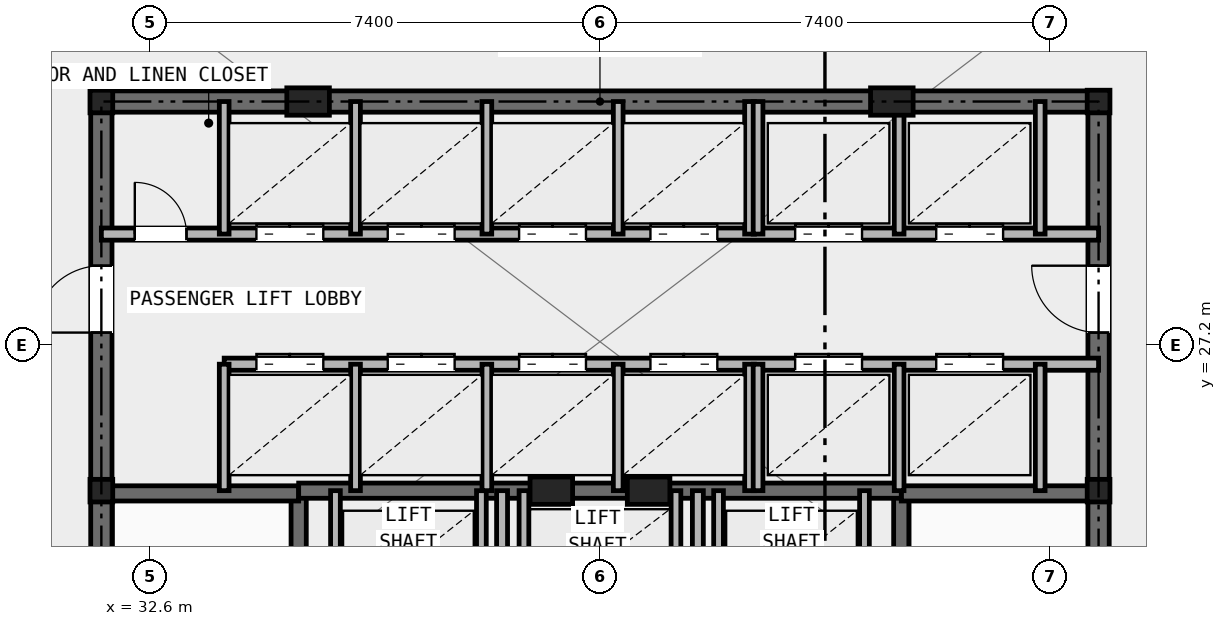
"""IFC4 building model, lengths in metres.
Left out: names, types, materials, properties, quantities, classifications, styles, units other than length and angle.
Written with IfcOpenShell. Run it as: python <this file> out.ifc"""

import sys

from ifc_helpers import new_model, si_unit, direction, frame, frame_2d, origin, origin_2d, place, context, subcontext, project, spatial, rectangle, i_section, extrude, element, fill, save


model = new_model("IFC4")
c1 = context("Model", 3, precision=1e-05, world=origin(), true_north=direction((0.0, 1.0)))
c2 = subcontext(c1, "Body", "Model", "MODEL_VIEW")
j1 = project(units=[si_unit("LENGTHUNIT", "METRE"), si_unit("PLANEANGLEUNIT", "RADIAN")], contexts=[c1])
p1 = place(None, origin())
s1 = spatial("IfcSite", under=j1, at=p1, CompositionType="ELEMENT")
p2 = place(p1, origin())
s2 = spatial("IfcBuilding", under=s1, at=p2, CompositionType="ELEMENT")
p3 = place(p2, origin())
s3 = spatial("IfcBuildingStorey", under=s2, at=p3, CompositionType="ELEMENT", Elevation=0.0)
for number, where, z_axis, x_axis in (
    (1, (31.8, 24.8, 0.0), (0.0, 0.0, 1.0), (1.0, 0.0, 0.0)),
    (2, (48.2, 24.8, 0.0), (0.0, 0.0, 1.0), (1.0, 0.0, 0.0)),
    (3, (31.8, 31.2, 0.0), (0.0, 0.0, 1.0), (1.0, 0.0, 0.0)),
    (4, (48.2, 31.2, 0.0), (0.0, 0.0, 1.0), (1.0, 0.0, 0.0)),
):
    element("IfcColumn", number, at=place(p3, frame(where, z_axis=z_axis, x_axis=x_axis)), inside=s3, PredefinedType="COLUMN", context=c2, shape_type="SweptSolid", body=[
        extrude(i_section(OverallWidth=0.374, OverallDepth=0.372, WebThickness=0.016, FlangeThickness=0.026, at=origin_2d()), origin(), (0.0, 0.0, 1.0), 5.5),
    ])
for number, where, z_axis, x_axis in (
    (5, (35.2, 31.2, 0.0), (0.0, 0.0, 1.0), (1.0, 0.0, 0.0)),
    (6, (44.8, 31.2, 0.0), (0.0, 0.0, 1.0), (1.0, 0.0, 0.0)),
    (7, (39.2, 24.8, 0.0), (0.0, 0.0, 1.0), (1.0, 0.0, 0.0)),
    (8, (40.8, 24.8, 0.0), (0.0, 0.0, 1.0), (1.0, 0.0, 0.0)),
):
    element("IfcColumn", number, at=place(p3, frame(where, z_axis=z_axis, x_axis=x_axis)), inside=s3, PredefinedType="PILASTER", context=c2, shape_type="SweptSolid", body=[
        extrude(rectangle(XDim=0.7, YDim=0.45, at=origin_2d()), origin(), (0.0, 0.0, 1.0), 5.5),
    ])
p4 = place(p3, frame((31.8, 31.2, 0.0), z_axis=(0.0, 0.0, 1.0), x_axis=(1.0, 0.0, 0.0)))
e9 = element("IfcWall", 9, at=p4, inside=s3, PredefinedType="SHEAR", context=c2, shape_type="SweptSolid", body=[
    extrude(rectangle(XDim=16.4, YDim=0.35, at=frame_2d((8.2, 0.0))), origin(), (0.0, 0.0, 1.0), 5.22),
])
p5 = place(p3, frame((31.8, 16.4, 0.0), z_axis=(0.0, 0.0, 1.0), x_axis=(0.0, 1.0, 0.0)))
e10 = element("IfcWall", 10, at=p5, inside=s3, PredefinedType="SHEAR", context=c2, shape_type="SweptSolid", body=[
    extrude(rectangle(XDim=14.8, YDim=0.35, at=frame_2d((7.4, 0.0))), origin(), (0.0, 0.0, 1.0), 5.22),
])
p6 = place(p5, frame((11.0, 0.0, 0.0)))
e11 = element("IfcOpeningElement", 11, at=p6, cuts=e10, PredefinedType="OPENING", context=c2, shape_type="SweptSolid", body=[
    extrude(rectangle(XDim=1.1, YDim=2.15, at=frame_2d((0.55, 1.075))), frame((0.0, 0.185, 0.0), z_axis=(0.0, -1.0, 0.0), x_axis=(1.0, 0.0, 0.0)), (0.0, 0.0, 1.0), 0.37),
])
p7 = place(p3, frame((48.2, 16.4, 0.0), z_axis=(0.0, 0.0, 1.0), x_axis=(0.0, 1.0, 0.0)))
e12 = element("IfcWall", 12, at=p7, inside=s3, PredefinedType="SHEAR", context=c2, shape_type="SweptSolid", body=[
    extrude(rectangle(XDim=14.8, YDim=0.35, at=frame_2d((7.4, 0.0))), origin(), (0.0, 0.0, 1.0), 5.22),
])
p8 = place(p7, frame((11.0, 0.0, 0.0)))
e13 = element("IfcOpeningElement", 13, at=p8, cuts=e12, PredefinedType="OPENING", context=c2, shape_type="SweptSolid", body=[
    extrude(rectangle(XDim=1.1, YDim=2.15, at=frame_2d((0.55, 1.075))), frame((0.0, 0.185, 0.0), z_axis=(0.0, -1.0, 0.0), x_axis=(1.0, 0.0, 0.0)), (0.0, 0.0, 1.0), 0.37),
])
p9 = place(p3, frame((35.045, 16.4, 0.0), z_axis=(0.0, 0.0, 1.0), x_axis=(0.0, 1.0, 0.0)))
e14 = element("IfcWall", 14, at=p9, inside=s3, PredefinedType="SHEAR", context=c2, shape_type="SweptSolid", body=[
    extrude(rectangle(XDim=8.4, YDim=0.25, at=frame_2d((4.2, 0.0))), origin(), (0.0, 0.0, 1.0), 5.22),
])
p10 = place(p9, frame((0.45, 0.0, 0.0)))
e15 = element("IfcOpeningElement", 15, at=p10, cuts=e14, PredefinedType="OPENING", context=c2, shape_type="SweptSolid", body=[
    extrude(rectangle(XDim=0.95, YDim=2.1, at=frame_2d((0.475, 1.05))), frame((0.0, 0.135, 0.0), z_axis=(0.0, -1.0, 0.0), x_axis=(1.0, 0.0, 0.0)), (0.0, 0.0, 1.0), 0.27),
])
p11 = place(p3, frame((31.8, 24.755, 0.0), z_axis=(0.0, 0.0, 1.0), x_axis=(1.0, 0.0, 0.0)))
e16 = element("IfcWall", 16, at=p11, inside=s3, PredefinedType="SHEAR", context=c2, shape_type="SweptSolid", body=[
    extrude(rectangle(XDim=3.245, YDim=0.25, at=frame_2d((1.623, 0.0))), origin(), (0.0, 0.0, 1.0), 5.22),
])
p12 = place(p3, frame((44.955, 16.4, 0.0), z_axis=(0.0, 0.0, 1.0), x_axis=(0.0, 1.0, 0.0)))
e17 = element("IfcWall", 17, at=p12, inside=s3, PredefinedType="SHEAR", context=c2, shape_type="SweptSolid", body=[
    extrude(rectangle(XDim=8.4, YDim=0.25, at=frame_2d((4.2, 0.0))), origin(), (0.0, 0.0, 1.0), 5.22),
])
p13 = place(p12, frame((0.45, 0.0, 0.0)))
e18 = element("IfcOpeningElement", 18, at=p13, cuts=e17, PredefinedType="OPENING", context=c2, shape_type="SweptSolid", body=[
    extrude(rectangle(XDim=0.95, YDim=2.1, at=frame_2d((0.475, 1.05))), frame((0.0, 0.135, 0.0), z_axis=(0.0, -1.0, 0.0), x_axis=(1.0, 0.0, 0.0)), (0.0, 0.0, 1.0), 0.27),
])
p14 = place(p3, frame((44.955, 24.755, 0.0), z_axis=(0.0, 0.0, 1.0), x_axis=(1.0, 0.0, 0.0)))
e19 = element("IfcWall", 19, at=p14, inside=s3, PredefinedType="SHEAR", context=c2, shape_type="SweptSolid", body=[
    extrude(rectangle(XDim=3.245, YDim=0.25, at=frame_2d((1.623, 0.0))), origin(), (0.0, 0.0, 1.0), 5.22),
])
p15 = place(p3, frame((35.045, 24.8, 0.0), z_axis=(0.0, 0.0, 1.0), x_axis=(1.0, 0.0, 0.0)))
e20 = element("IfcWall", 20, at=p15, inside=s3, PredefinedType="SHEAR", context=c2, shape_type="SweptSolid", body=[
    extrude(rectangle(XDim=9.91, YDim=0.25, at=frame_2d((4.955, 0.0))), origin(), (0.0, 0.0, 1.0), 5.22),
])
p16 = place(p3, frame((38.39, 16.4, 0.0), z_axis=(0.0, 0.0, 1.0), x_axis=(0.0, 1.0, 0.0)))
e21 = element("IfcWall", 21, at=p16, inside=s3, PredefinedType="PARTITIONING", context=c2, shape_type="SweptSolid", body=[
    extrude(rectangle(XDim=8.4, YDim=0.18, at=frame_2d((4.2, 0.0))), origin(), (0.0, 0.0, 1.0), 4.671),
])
p17 = place(p16, frame((3.8, 0.0, 0.0)))
e22 = element("IfcOpeningElement", 22, at=p17, cuts=e21, PredefinedType="OPENING", context=c2, shape_type="SweptSolid", body=[
    extrude(rectangle(XDim=0.95, YDim=2.1, at=frame_2d((0.475, 1.05))), frame((0.0, 0.1, 0.0), z_axis=(0.0, -1.0, 0.0), x_axis=(1.0, 0.0, 0.0)), (0.0, 0.0, 1.0), 0.2),
])
p18 = place(p3, frame((41.61, 16.4, 0.0), z_axis=(0.0, 0.0, 1.0), x_axis=(0.0, 1.0, 0.0)))
e23 = element("IfcWall", 23, at=p18, inside=s3, PredefinedType="PARTITIONING", context=c2, shape_type="SweptSolid", body=[
    extrude(rectangle(XDim=8.4, YDim=0.18, at=frame_2d((4.2, 0.0))), origin(), (0.0, 0.0, 1.0), 4.671),
])
for number, where, z_axis, x_axis in (
    (24, (35.65, 22.48, 0.0), (0.0, 0.0, 1.0), (0.0, 1.0, 0.0)),
    (25, (38.05, 22.48, 0.0), (0.0, 0.0, 1.0), (0.0, 1.0, 0.0)),
    (26, (41.95, 22.48, 0.0), (0.0, 0.0, 1.0), (0.0, 1.0, 0.0)),
    (27, (44.35, 22.48, 0.0), (0.0, 0.0, 1.0), (0.0, 1.0, 0.0)),
    (28, (38.75, 22.48, 0.0), (0.0, 0.0, 1.0), (0.0, 1.0, 0.0)),
    (29, (41.25, 22.48, 0.0), (0.0, 0.0, 1.0), (0.0, 1.0, 0.0)),
):
    element("IfcWall", number, at=place(p3, frame(where, z_axis=z_axis, x_axis=x_axis)), inside=s3, PredefinedType="SOLIDWALL", context=c2, shape_type="SweptSolid", body=[
        extrude(rectangle(XDim=2.32, YDim=0.16, at=frame_2d((1.16, 0.0))), origin(), (0.0, 0.0, 1.0), 5.22),
    ])
p19 = place(p3, frame((31.8, 29.02, 0.0), z_axis=(0.0, 0.0, 1.0), x_axis=(1.0, 0.0, 0.0)))
e30 = element("IfcWall", 30, at=p19, inside=s3, PredefinedType="SOLIDWALL", context=c2, shape_type="SweptSolid", body=[
    extrude(rectangle(XDim=16.4, YDim=0.2, at=frame_2d((8.2, 0.0))), origin(), (0.0, 0.0, 1.0), 4.671),
])
p20 = place(p19, frame((0.55, 0.0, 0.0)))
e31 = element("IfcOpeningElement", 31, at=p20, cuts=e30, PredefinedType="OPENING", context=c2, shape_type="SweptSolid", body=[
    extrude(rectangle(XDim=0.85, YDim=2.05, at=frame_2d((0.425, 1.025))), frame((0.0, 0.11, 0.0), z_axis=(0.0, -1.0, 0.0), x_axis=(1.0, 0.0, 0.0)), (0.0, 0.0, 1.0), 0.22),
])
p21 = place(p19, frame((2.55, 0.0, 0.0)))
e32 = element("IfcOpeningElement", 32, at=p21, cuts=e30, PredefinedType="OPENING", context=c2, shape_type="SweptSolid", body=[
    extrude(rectangle(XDim=1.1, YDim=2.15, at=frame_2d((0.55, 1.075))), frame((0.0, 0.11, 0.0), z_axis=(0.0, -1.0, 0.0), x_axis=(1.0, 0.0, 0.0)), (0.0, 0.0, 1.0), 0.22),
])
p22 = place(p19, frame((4.71, 0.0, 0.0)))
e33 = element("IfcOpeningElement", 33, at=p22, cuts=e30, PredefinedType="OPENING", context=c2, shape_type="SweptSolid", body=[
    extrude(rectangle(XDim=1.1, YDim=2.15, at=frame_2d((0.55, 1.075))), frame((0.0, 0.11, 0.0), z_axis=(0.0, -1.0, 0.0), x_axis=(1.0, 0.0, 0.0)), (0.0, 0.0, 1.0), 0.22),
])
p23 = place(p19, frame((6.87, 0.0, 0.0)))
e34 = element("IfcOpeningElement", 34, at=p23, cuts=e30, PredefinedType="OPENING", context=c2, shape_type="SweptSolid", body=[
    extrude(rectangle(XDim=1.1, YDim=2.15, at=frame_2d((0.55, 1.075))), frame((0.0, 0.11, 0.0), z_axis=(0.0, -1.0, 0.0), x_axis=(1.0, 0.0, 0.0)), (0.0, 0.0, 1.0), 0.22),
])
p24 = place(p19, frame((9.03, 0.0, 0.0)))
e35 = element("IfcOpeningElement", 35, at=p24, cuts=e30, PredefinedType="OPENING", context=c2, shape_type="SweptSolid", body=[
    extrude(rectangle(XDim=1.1, YDim=2.15, at=frame_2d((0.55, 1.075))), frame((0.0, 0.11, 0.0), z_axis=(0.0, -1.0, 0.0), x_axis=(1.0, 0.0, 0.0)), (0.0, 0.0, 1.0), 0.22),
])
p25 = place(p19, frame((11.41, 0.0, 0.0)))
e36 = element("IfcOpeningElement", 36, at=p25, cuts=e30, PredefinedType="OPENING", context=c2, shape_type="SweptSolid", body=[
    extrude(rectangle(XDim=1.1, YDim=2.15, at=frame_2d((0.55, 1.075))), frame((0.0, 0.11, 0.0), z_axis=(0.0, -1.0, 0.0), x_axis=(1.0, 0.0, 0.0)), (0.0, 0.0, 1.0), 0.22),
])
p26 = place(p19, frame((13.73, 0.0, 0.0)))
e37 = element("IfcOpeningElement", 37, at=p26, cuts=e30, PredefinedType="OPENING", context=c2, shape_type="SweptSolid", body=[
    extrude(rectangle(XDim=1.1, YDim=2.15, at=frame_2d((0.55, 1.075))), frame((0.0, 0.11, 0.0), z_axis=(0.0, -1.0, 0.0), x_axis=(1.0, 0.0, 0.0)), (0.0, 0.0, 1.0), 0.22),
])
p27 = place(p3, frame((33.82, 26.88, 0.0), z_axis=(0.0, 0.0, 1.0), x_axis=(1.0, 0.0, 0.0)))
e38 = element("IfcWall", 38, at=p27, inside=s3, PredefinedType="SOLIDWALL", context=c2, shape_type="SweptSolid", body=[
    extrude(rectangle(XDim=14.38, YDim=0.2, at=frame_2d((7.19, 0.0))), origin(), (0.0, 0.0, 1.0), 4.671),
])
p28 = place(p27, frame((0.53, 0.0, 0.0)))
e39 = element("IfcOpeningElement", 39, at=p28, cuts=e38, PredefinedType="OPENING", context=c2, shape_type="SweptSolid", body=[
    extrude(rectangle(XDim=1.1, YDim=2.15, at=frame_2d((0.55, 1.075))), frame((0.0, 0.11, 0.0), z_axis=(0.0, -1.0, 0.0), x_axis=(1.0, 0.0, 0.0)), (0.0, 0.0, 1.0), 0.22),
])
p29 = place(p27, frame((2.69, 0.0, 0.0)))
e40 = element("IfcOpeningElement", 40, at=p29, cuts=e38, PredefinedType="OPENING", context=c2, shape_type="SweptSolid", body=[
    extrude(rectangle(XDim=1.1, YDim=2.15, at=frame_2d((0.55, 1.075))), frame((0.0, 0.11, 0.0), z_axis=(0.0, -1.0, 0.0), x_axis=(1.0, 0.0, 0.0)), (0.0, 0.0, 1.0), 0.22),
])
p30 = place(p27, frame((4.85, 0.0, 0.0)))
e41 = element("IfcOpeningElement", 41, at=p30, cuts=e38, PredefinedType="OPENING", context=c2, shape_type="SweptSolid", body=[
    extrude(rectangle(XDim=1.1, YDim=2.15, at=frame_2d((0.55, 1.075))), frame((0.0, 0.11, 0.0), z_axis=(0.0, -1.0, 0.0), x_axis=(1.0, 0.0, 0.0)), (0.0, 0.0, 1.0), 0.22),
])
p31 = place(p27, frame((7.01, 0.0, 0.0)))
e42 = element("IfcOpeningElement", 42, at=p31, cuts=e38, PredefinedType="OPENING", context=c2, shape_type="SweptSolid", body=[
    extrude(rectangle(XDim=1.1, YDim=2.15, at=frame_2d((0.55, 1.075))), frame((0.0, 0.11, 0.0), z_axis=(0.0, -1.0, 0.0), x_axis=(1.0, 0.0, 0.0)), (0.0, 0.0, 1.0), 0.22),
])
p32 = place(p27, frame((9.39, 0.0, 0.0)))
e43 = element("IfcOpeningElement", 43, at=p32, cuts=e38, PredefinedType="OPENING", context=c2, shape_type="SweptSolid", body=[
    extrude(rectangle(XDim=1.1, YDim=2.15, at=frame_2d((0.55, 1.075))), frame((0.0, 0.11, 0.0), z_axis=(0.0, -1.0, 0.0), x_axis=(1.0, 0.0, 0.0)), (0.0, 0.0, 1.0), 0.22),
])
p33 = place(p27, frame((11.71, 0.0, 0.0)))
e44 = element("IfcOpeningElement", 44, at=p33, cuts=e38, PredefinedType="OPENING", context=c2, shape_type="SweptSolid", body=[
    extrude(rectangle(XDim=1.1, YDim=2.15, at=frame_2d((0.55, 1.075))), frame((0.0, 0.11, 0.0), z_axis=(0.0, -1.0, 0.0), x_axis=(1.0, 0.0, 0.0)), (0.0, 0.0, 1.0), 0.22),
])
p34 = place(p3, frame((33.82, 29.02, 0.0), z_axis=(0.0, 0.0, 1.0), x_axis=(0.0, 1.0, 0.0)))
e45 = element("IfcWall", 45, at=p34, inside=s3, PredefinedType="SOLIDWALL", context=c2, shape_type="SweptSolid", body=[
    extrude(rectangle(XDim=2.18, YDim=0.16, at=frame_2d((1.09, 0.0))), origin(), (0.0, 0.0, 1.0), 4.671),
])
p35 = place(p3, frame((33.82, 24.8, 0.0), z_axis=(0.0, 0.0, 1.0), x_axis=(0.0, 1.0, 0.0)))
e46 = element("IfcWall", 46, at=p35, inside=s3, PredefinedType="SOLIDWALL", context=c2, shape_type="SweptSolid", body=[
    extrude(rectangle(XDim=2.08, YDim=0.16, at=frame_2d((1.04, 0.0))), origin(), (0.0, 0.0, 1.0), 5.22),
])
for number, where, z_axis, x_axis in (
    (47, (35.98, 29.02, 0.0), (0.0, 0.0, 1.0), (0.0, 1.0, 0.0)),
    (48, (38.14, 29.02, 0.0), (0.0, 0.0, 1.0), (0.0, 1.0, 0.0)),
    (49, (40.3, 29.02, 0.0), (0.0, 0.0, 1.0), (0.0, 1.0, 0.0)),
    (50, (42.46, 29.02, 0.0), (0.0, 0.0, 1.0), (0.0, 1.0, 0.0)),
):
    element("IfcWall", number, at=place(p3, frame(where, z_axis=z_axis, x_axis=x_axis)), inside=s3, PredefinedType="SOLIDWALL", context=c2, shape_type="SweptSolid", body=[
        extrude(rectangle(XDim=2.18, YDim=0.16, at=frame_2d((1.09, 0.0))), origin(), (0.0, 0.0, 1.0), 4.671),
    ])
for number, where, z_axis, x_axis in (
    (51, (35.98, 24.8, 0.0), (0.0, 0.0, 1.0), (0.0, 1.0, 0.0)),
    (52, (38.14, 24.8, 0.0), (0.0, 0.0, 1.0), (0.0, 1.0, 0.0)),
    (53, (40.3, 24.8, 0.0), (0.0, 0.0, 1.0), (0.0, 1.0, 0.0)),
    (54, (42.46, 24.8, 0.0), (0.0, 0.0, 1.0), (0.0, 1.0, 0.0)),
):
    element("IfcWall", number, at=place(p3, frame(where, z_axis=z_axis, x_axis=x_axis)), inside=s3, PredefinedType="SOLIDWALL", context=c2, shape_type="SweptSolid", body=[
        extrude(rectangle(XDim=2.08, YDim=0.16, at=frame_2d((1.04, 0.0))), origin(), (0.0, 0.0, 1.0), 5.22),
    ])
for number, where, z_axis, x_axis in (
    (55, (42.6, 29.02, 0.0), (0.0, 0.0, 1.0), (0.0, 1.0, 0.0)),
    (56, (44.92, 29.02, 0.0), (0.0, 0.0, 1.0), (0.0, 1.0, 0.0)),
    (57, (47.24, 29.02, 0.0), (0.0, 0.0, 1.0), (0.0, 1.0, 0.0)),
):
    element("IfcWall", number, at=place(p3, frame(where, z_axis=z_axis, x_axis=x_axis)), inside=s3, PredefinedType="SOLIDWALL", context=c2, shape_type="SweptSolid", body=[
        extrude(rectangle(XDim=2.18, YDim=0.16, at=frame_2d((1.09, 0.0))), origin(), (0.0, 0.0, 1.0), 4.671),
    ])
for number, where, z_axis, x_axis in (
    (58, (42.6, 24.8, 0.0), (0.0, 0.0, 1.0), (0.0, 1.0, 0.0)),
    (59, (44.92, 24.8, 0.0), (0.0, 0.0, 1.0), (0.0, 1.0, 0.0)),
    (60, (47.24, 24.8, 0.0), (0.0, 0.0, 1.0), (0.0, 1.0, 0.0)),
):
    element("IfcWall", number, at=place(p3, frame(where, z_axis=z_axis, x_axis=x_axis)), inside=s3, PredefinedType="SOLIDWALL", context=c2, shape_type="SweptSolid", body=[
        extrude(rectangle(XDim=2.08, YDim=0.16, at=frame_2d((1.04, 0.0))), origin(), (0.0, 0.0, 1.0), 5.22),
    ])
p36 = place(p20, origin())
e61 = element("IfcDoor", 61, at=p36, inside=s3, OperationType="SINGLE_SWING_LEFT", PredefinedType="DOOR", context=c2, shape_type="SweptSolid", body=[
    extrude(rectangle(XDim=0.85, YDim=2.05, at=frame_2d((0.425, 1.025))), frame((0.0, 0.025, 0.0), z_axis=(0.0, -1.0, 0.0), x_axis=(1.0, 0.0, 0.0)), (0.0, 0.0, 1.0), 0.05),
])
fill(e31, e61)
p37 = place(p6, origin())
e62 = element("IfcDoor", 62, at=p37, inside=s3, OperationType="SINGLE_SWING_LEFT", PredefinedType="DOOR", context=c2, shape_type="SweptSolid", body=[
    extrude(rectangle(XDim=1.1, YDim=2.15, at=frame_2d((0.55, 1.075))), frame((0.0, 0.025, 0.0), z_axis=(0.0, -1.0, 0.0), x_axis=(1.0, 0.0, 0.0)), (0.0, 0.0, 1.0), 0.05),
])
fill(e11, e62)
p38 = place(p8, origin())
e63 = element("IfcDoor", 63, at=p38, inside=s3, OperationType="SINGLE_SWING_RIGHT", PredefinedType="DOOR", context=c2, shape_type="SweptSolid", body=[
    extrude(rectangle(XDim=1.1, YDim=2.15, at=frame_2d((0.55, 1.075))), frame((0.0, 0.025, 0.0), z_axis=(0.0, -1.0, 0.0), x_axis=(1.0, 0.0, 0.0)), (0.0, 0.0, 1.0), 0.05),
])
fill(e13, e63)
p39 = place(p21, origin())
e64 = element("IfcDoor", 64, at=p39, inside=s3, OperationType="DOUBLE_DOOR_SLIDING", PredefinedType="DOOR", context=c2, shape_type="SweptSolid", body=[
    extrude(rectangle(XDim=1.1, YDim=2.15, at=frame_2d((0.55, 1.075))), frame((0.0, 0.025, 0.0), z_axis=(0.0, -1.0, 0.0), x_axis=(1.0, 0.0, 0.0)), (0.0, 0.0, 1.0), 0.05),
])
fill(e32, e64)
p40 = place(p22, origin())
e65 = element("IfcDoor", 65, at=p40, inside=s3, OperationType="DOUBLE_DOOR_SLIDING", PredefinedType="DOOR", context=c2, shape_type="SweptSolid", body=[
    extrude(rectangle(XDim=1.1, YDim=2.15, at=frame_2d((0.55, 1.075))), frame((0.0, 0.025, 0.0), z_axis=(0.0, -1.0, 0.0), x_axis=(1.0, 0.0, 0.0)), (0.0, 0.0, 1.0), 0.05),
])
fill(e33, e65)
p41 = place(p23, origin())
e66 = element("IfcDoor", 66, at=p41, inside=s3, OperationType="DOUBLE_DOOR_SLIDING", PredefinedType="DOOR", context=c2, shape_type="SweptSolid", body=[
    extrude(rectangle(XDim=1.1, YDim=2.15, at=frame_2d((0.55, 1.075))), frame((0.0, 0.025, 0.0), z_axis=(0.0, -1.0, 0.0), x_axis=(1.0, 0.0, 0.0)), (0.0, 0.0, 1.0), 0.05),
])
fill(e34, e66)
p42 = place(p24, origin())
e67 = element("IfcDoor", 67, at=p42, inside=s3, OperationType="DOUBLE_DOOR_SLIDING", PredefinedType="DOOR", context=c2, shape_type="SweptSolid", body=[
    extrude(rectangle(XDim=1.1, YDim=2.15, at=frame_2d((0.55, 1.075))), frame((0.0, 0.025, 0.0), z_axis=(0.0, -1.0, 0.0), x_axis=(1.0, 0.0, 0.0)), (0.0, 0.0, 1.0), 0.05),
])
fill(e35, e67)
p43 = place(p28, origin())
e68 = element("IfcDoor", 68, at=p43, inside=s3, OperationType="DOUBLE_DOOR_SLIDING", PredefinedType="DOOR", context=c2, shape_type="SweptSolid", body=[
    extrude(rectangle(XDim=1.1, YDim=2.15, at=frame_2d((0.55, 1.075))), frame((0.0, 0.025, 0.0), z_axis=(0.0, -1.0, 0.0), x_axis=(1.0, 0.0, 0.0)), (0.0, 0.0, 1.0), 0.05),
])
fill(e39, e68)
p44 = place(p29, origin())
e69 = element("IfcDoor", 69, at=p44, inside=s3, OperationType="DOUBLE_DOOR_SLIDING", PredefinedType="DOOR", context=c2, shape_type="SweptSolid", body=[
    extrude(rectangle(XDim=1.1, YDim=2.15, at=frame_2d((0.55, 1.075))), frame((0.0, 0.025, 0.0), z_axis=(0.0, -1.0, 0.0), x_axis=(1.0, 0.0, 0.0)), (0.0, 0.0, 1.0), 0.05),
])
fill(e40, e69)
p45 = place(p30, origin())
e70 = element("IfcDoor", 70, at=p45, inside=s3, OperationType="DOUBLE_DOOR_SLIDING", PredefinedType="DOOR", context=c2, shape_type="SweptSolid", body=[
    extrude(rectangle(XDim=1.1, YDim=2.15, at=frame_2d((0.55, 1.075))), frame((0.0, 0.025, 0.0), z_axis=(0.0, -1.0, 0.0), x_axis=(1.0, 0.0, 0.0)), (0.0, 0.0, 1.0), 0.05),
])
fill(e41, e70)
p46 = place(p31, origin())
e71 = element("IfcDoor", 71, at=p46, inside=s3, OperationType="DOUBLE_DOOR_SLIDING", PredefinedType="DOOR", context=c2, shape_type="SweptSolid", body=[
    extrude(rectangle(XDim=1.1, YDim=2.15, at=frame_2d((0.55, 1.075))), frame((0.0, 0.025, 0.0), z_axis=(0.0, -1.0, 0.0), x_axis=(1.0, 0.0, 0.0)), (0.0, 0.0, 1.0), 0.05),
])
fill(e42, e71)
p47 = place(p25, origin())
e72 = element("IfcDoor", 72, at=p47, inside=s3, OperationType="DOUBLE_DOOR_SLIDING", PredefinedType="DOOR", context=c2, shape_type="SweptSolid", body=[
    extrude(rectangle(XDim=1.1, YDim=2.15, at=frame_2d((0.55, 1.075))), frame((0.0, 0.025, 0.0), z_axis=(0.0, -1.0, 0.0), x_axis=(1.0, 0.0, 0.0)), (0.0, 0.0, 1.0), 0.05),
])
fill(e36, e72)
p48 = place(p26, origin())
e73 = element("IfcDoor", 73, at=p48, inside=s3, OperationType="DOUBLE_DOOR_SLIDING", PredefinedType="DOOR", context=c2, shape_type="SweptSolid", body=[
    extrude(rectangle(XDim=1.1, YDim=2.15, at=frame_2d((0.55, 1.075))), frame((0.0, 0.025, 0.0), z_axis=(0.0, -1.0, 0.0), x_axis=(1.0, 0.0, 0.0)), (0.0, 0.0, 1.0), 0.05),
])
fill(e37, e73)
p49 = place(p32, origin())
e74 = element("IfcDoor", 74, at=p49, inside=s3, OperationType="DOUBLE_DOOR_SLIDING", PredefinedType="DOOR", context=c2, shape_type="SweptSolid", body=[
    extrude(rectangle(XDim=1.1, YDim=2.15, at=frame_2d((0.55, 1.075))), frame((0.0, 0.025, 0.0), z_axis=(0.0, -1.0, 0.0), x_axis=(1.0, 0.0, 0.0)), (0.0, 0.0, 1.0), 0.05),
])
fill(e43, e74)
p50 = place(p33, origin())
e75 = element("IfcDoor", 75, at=p50, inside=s3, OperationType="DOUBLE_DOOR_SLIDING", PredefinedType="DOOR", context=c2, shape_type="SweptSolid", body=[
    extrude(rectangle(XDim=1.1, YDim=2.15, at=frame_2d((0.55, 1.075))), frame((0.0, 0.025, 0.0), z_axis=(0.0, -1.0, 0.0), x_axis=(1.0, 0.0, 0.0)), (0.0, 0.0, 1.0), 0.05),
])
fill(e44, e75)
save(model, sys.argv[1])
